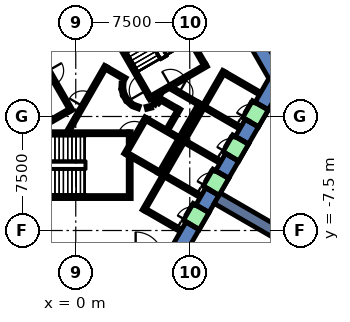
"""IFC4 building model, lengths in metres.
Left out: names, types, materials, properties, quantities, classifications, styles, units other than length and angle.
Written with IfcOpenShell. Run it as: python <this file> out.ifc"""

import sys

from ifc_helpers import new_model, si_unit, direction, frame, frame_2d, origin, place, context, subcontext, project, spatial, polyline, rectangle, outline, extrude, element, fill, save


model = new_model("IFC4")
c1 = context("Model", 3, precision=1e-05, world=origin(), true_north=direction((0.0, 1.0)))
c2 = subcontext(c1, "Body", "Model", "MODEL_VIEW")
j1 = project(units=[si_unit("LENGTHUNIT", "METRE"), si_unit("PLANEANGLEUNIT", "RADIAN")], contexts=[c1])
p1 = place(None, origin())
s1 = spatial("IfcSite", under=j1, at=p1, CompositionType="ELEMENT")
p2 = place(p1, origin())
s2 = spatial("IfcBuilding", under=s1, at=p2, CompositionType="ELEMENT")
p3 = place(p2, origin())
s3 = spatial("IfcBuildingStorey", under=s2, at=p3, CompositionType="ELEMENT", Elevation=0.0)
p4 = place(p3, frame((0.0, 0.0, -0.5)))
e1 = element("IfcWall", 1, at=p4, inside=s3, PredefinedType="SHEAR", context=c2, shape_type="SweptSolid", body=[
    extrude(outline(polyline([(8.517, 11.748), (7.651, 11.248), (12.702, 2.5), (13.856, 2.5), (8.517, 11.748)])), origin(), (0.0, 0.0, 1.0), 9.05),
])
p5 = place(p3, frame((0.0, 0.0, -0.5)))
e2 = element("IfcWall", 2, at=p5, inside=s3, PredefinedType="SHEAR", context=c2, shape_type="SweptSolid", body=[
    extrude(outline(polyline([(8.117, -7.44), (7.252, -6.94), (6.351, -8.5), (6.928, -9.5), (8.117, -7.44)])), origin(), (0.0, 0.0, 1.0), 9.05),
])
p6 = place(p3, frame((0.0, 0.0, -0.5)))
e3 = element("IfcWall", 3, at=p6, inside=s3, PredefinedType="SHEAR", context=c2, shape_type="SweptSolid", body=[
    extrude(outline(polyline([(9.417, -5.189), (8.551, -4.689), (7.902, -5.814), (8.767, -6.314), (9.417, -5.189)])), origin(), (0.0, 0.0, 1.0), 9.05),
])
p7 = place(p3, frame((0.0, 0.0, -0.5)))
e4 = element("IfcWall", 4, at=p7, inside=s3, PredefinedType="SHEAR", context=c2, shape_type="SweptSolid", body=[
    extrude(outline(polyline([(10.717, -2.937), (9.851, -2.437), (9.201, -3.563), (10.067, -4.063), (10.717, -2.937)])), origin(), (0.0, 0.0, 1.0), 9.05),
])
p8 = place(p3, frame((0.0, 0.0, -0.5)))
e5 = element("IfcWall", 5, at=p8, inside=s3, PredefinedType="SHEAR", context=c2, shape_type="SweptSolid", body=[
    extrude(outline(polyline([(12.017, -0.686), (11.151, -0.186), (10.501, -1.311), (11.367, -1.811), (12.017, -0.686)])), origin(), (0.0, 0.0, 1.0), 9.05),
])
p9 = place(p3, frame((0.0, 0.0, -0.5)))
e6 = element("IfcWall", 6, at=p9, inside=s3, PredefinedType="SHEAR", context=c2, shape_type="SweptSolid", body=[
    extrude(outline(polyline([(11.801, 0.94), (12.667, 0.44), (13.856, 2.5), (12.702, 2.5), (11.801, 0.94)])), origin(), (0.0, 0.0, 1.0), 9.05),
])
p10 = place(p3, frame((0.0, 0.0, 3.6)))
e7 = element("IfcWall", 7, at=p10, inside=s3, PredefinedType="SHEAR", context=c2, shape_type="SweptSolid", body=[
    extrude(outline(polyline([(8.767, -6.314), (7.902, -5.814), (7.252, -6.94), (8.117, -7.44), (8.767, -6.314)])), origin(), (0.0, 0.0, 1.0), 4.95),
])
p11 = place(p3, frame((0.0, 0.0, 3.6)))
e8 = element("IfcWall", 8, at=p11, inside=s3, PredefinedType="SHEAR", context=c2, shape_type="SweptSolid", body=[
    extrude(outline(polyline([(10.067, -4.063), (9.201, -3.563), (8.551, -4.689), (9.417, -5.189), (10.067, -4.063)])), origin(), (0.0, 0.0, 1.0), 4.95),
])
p12 = place(p3, frame((0.0, 0.0, 3.6)))
e9 = element("IfcWall", 9, at=p12, inside=s3, PredefinedType="SHEAR", context=c2, shape_type="SweptSolid", body=[
    extrude(outline(polyline([(11.367, -1.811), (10.501, -1.311), (9.851, -2.437), (10.717, -2.937), (11.367, -1.811)])), origin(), (0.0, 0.0, 1.0), 4.95),
])
p13 = place(p3, frame((0.0, 0.0, 3.6)))
e10 = element("IfcWall", 10, at=p13, inside=s3, PredefinedType="SHEAR", context=c2, shape_type="SweptSolid", body=[
    extrude(outline(polyline([(12.667, 0.44), (11.801, 0.94), (11.151, -0.186), (12.017, -0.686), (12.667, 0.44)])), origin(), (0.0, 0.0, 1.0), 4.95),
])
p14 = place(p3, frame((9.31, -5.375, -0.5), z_axis=(0.0, 0.0, 1.0), x_axis=(0.866017533419, -0.500013631625, 0.0)))
e11 = element("IfcWall", 11, at=p14, inside=s3, PredefinedType="SHEAR", context=c2, shape_type="SweptSolid", body=[
    extrude(rectangle(XDim=9.0, YDim=0.8, at=frame_2d((4.5, 0.0))), origin(), (0.0, 0.0, 1.0), 9.05),
])
p15 = place(p3, frame((5.39, 0.898, 0.0), z_axis=(0.0, 0.0, 1.0), x_axis=(0.673828488714, 0.738887791073, 0.0)))
e12 = element("IfcWall", 12, at=p15, inside=s3, PredefinedType="PARTITIONING", context=c2, shape_type="SweptSolid", body=[
    extrude(rectangle(XDim=0.263, YDim=0.2, at=frame_2d((0.131, 0.0))), origin(), (0.0, 0.0, 1.0), 8.55),
])
p16 = place(p3, frame((5.499, 1.172, 0.0), z_axis=(0.0, 0.0, 1.0), x_axis=(0.866333505267, -0.499465972466, 0.0)))
e13 = element("IfcWall", 13, at=p16, inside=s3, PredefinedType="PARTITIONING", context=c2, shape_type="SweptSolid", body=[
    extrude(rectangle(XDim=1.374, YDim=0.2, at=frame_2d((0.687, 0.0))), origin(), (0.0, 0.0, 1.0), 8.55),
])
p17 = place(p3, frame((6.826, 0.522, 0.0), z_axis=(0.0, 0.0, 1.0), x_axis=(-0.500016722714, -0.866015748706, 0.0)))
e14 = element("IfcWall", 14, at=p17, inside=s3, PredefinedType="PARTITIONING", context=c2, shape_type="SweptSolid", body=[
    extrude(rectangle(XDim=1.7, YDim=0.2, at=frame_2d((0.85, 0.0))), origin(), (0.0, 0.0, 1.0), 8.55),
])
p18 = place(p3, frame((8.192, 0.888, 0.0), z_axis=(0.0, 0.0, 1.0), x_axis=(-0.499940625693, -0.866059680843, 0.0)))
e15 = element("IfcWall", 15, at=p18, inside=s3, PredefinedType="PARTITIONING", context=c2, shape_type="SweptSolid", body=[
    extrude(rectangle(XDim=2.68, YDim=0.2, at=frame_2d((1.34, 0.0))), origin(), (0.0, 0.0, 1.0), 8.55),
])
p19 = place(p3, frame((5.135, 0.793, 0.0), z_axis=(0.0, 0.0, 1.0), x_axis=(0.499526442893, 0.866298639529, 0.0)))
e16 = element("IfcWall", 16, at=p19, inside=s3, PredefinedType="PARTITIONING", context=c2, shape_type="SweptSolid", body=[
    extrude(rectangle(XDim=0.791, YDim=0.2, at=frame_2d((0.396, 0.0))), origin(), (0.0, 0.0, 1.0), 8.55),
])
p20 = place(p3, frame((6.25, 1.894, 0.0), z_axis=(0.0, 0.0, 1.0), x_axis=(0.866043184279, -0.499969202016, 0.0)))
e17 = element("IfcWall", 17, at=p20, inside=s3, PredefinedType="PARTITIONING", context=c2, shape_type="SweptSolid", body=[
    extrude(rectangle(XDim=2.084, YDim=0.2, at=frame_2d((1.042, 0.0))), origin(), (0.0, 0.0, 1.0), 8.55),
])
p21 = place(p20, frame((0.642, 0.0, 0.0)))
e18 = element("IfcOpeningElement", 18, at=p21, cuts=e17, PredefinedType="OPENING", context=c2, shape_type="SweptSolid", body=[
    extrude(rectangle(XDim=0.9, YDim=2.1, at=frame_2d((0.45, 1.05))), frame((0.0, 0.11, 0.0), z_axis=(0.0, -1.0, 0.0), x_axis=(1.0, 0.0, 0.0)), (0.0, 0.0, 1.0), 0.22),
])
p22 = place(p3, frame((3.079, 2.199, 0.0), z_axis=(0.0, 0.0, 1.0), x_axis=(-0.047771483479, -0.998858290933, 0.0)))
e19 = element("IfcWall", 19, at=p22, inside=s3, PredefinedType="PARTITIONING", context=c2, shape_type="SweptSolid", body=[
    extrude(rectangle(XDim=0.337, YDim=0.2, at=frame_2d((0.169, 0.0))), origin(), (0.0, 0.0, 1.0), 8.55),
])
p23 = place(p3, frame((3.07, 1.786, 0.0), z_axis=(0.0, 0.0, 1.0), x_axis=(0.242705583207, -0.970099994784, 0.0)))
e20 = element("IfcWall", 20, at=p23, inside=s3, PredefinedType="PARTITIONING", context=c2, shape_type="SweptSolid", body=[
    extrude(rectangle(XDim=0.338, YDim=0.2, at=frame_2d((0.169, 0.0))), origin(), (0.0, 0.0, 1.0), 8.55),
])
for number, where, z_axis, x_axis in (
    (21, (3.182, 1.388, 0.0), (0.0, 0.0, 1.0), (0.512, -0.859, 0.0)),
    (22, (3.404, 1.039, 0.0), (0.0, 0.0, 1.0), (0.74, -0.672, 0.0)),
):
    element("IfcWall", number, at=place(p3, frame(where, z_axis=z_axis, x_axis=x_axis)), inside=s3, PredefinedType="PARTITIONING", context=c2, shape_type="SweptSolid", body=[
        extrude(rectangle(XDim=0.338, YDim=0.2, at=frame_2d((0.169, 0.0))), origin(), (0.0, 0.0, 1.0), 8.55),
    ])
p24 = place(p3, frame((3.838, 0.702, 0.0), z_axis=(0.0, 0.0, 1.0), x_axis=(0.941035081519, -0.338308993895, 0.0)))
e23 = element("IfcWall", 23, at=p24, inside=s3, PredefinedType="PARTITIONING", context=c2, shape_type="SweptSolid", body=[
    extrude(rectangle(XDim=0.337, YDim=0.2, at=frame_2d((0.168, 0.0))), origin(), (0.0, 0.0, 1.0), 8.55),
])
p25 = place(p3, frame((4.644, 0.564, 0.0), z_axis=(0.0, 0.0, 1.0), x_axis=(0.969929076366, 0.243387729394, 0.0)))
e24 = element("IfcWall", 24, at=p25, inside=s3, PredefinedType="PARTITIONING", context=c2, shape_type="SweptSolid", body=[
    extrude(rectangle(XDim=0.337, YDim=0.2, at=frame_2d((0.168, 0.0))), origin(), (0.0, 0.0, 1.0), 8.55),
])
p26 = place(p3, frame((-0.52, -1.0, 0.0), z_axis=(0.0, 0.0, 1.0), x_axis=(0.50011622646, 0.865958290007, 0.0)))
e25 = element("IfcWall", 25, at=p26, inside=s3, PredefinedType="PARTITIONING", context=c2, shape_type="SweptSolid", body=[
    extrude(rectangle(XDim=4.991, YDim=0.2, at=frame_2d((2.496, 0.0))), origin(), (0.0, 0.0, 1.0), 8.55),
])
p27 = place(p26, frame((1.945, 0.0, 0.0)))
e26 = element("IfcOpeningElement", 26, at=p27, cuts=e25, PredefinedType="OPENING", context=c2, shape_type="SweptSolid", body=[
    extrude(rectangle(XDim=1.0, YDim=2.1, at=frame_2d((0.5, 1.05))), frame((0.0, 0.11, 0.0), z_axis=(0.0, -1.0, 0.0), x_axis=(1.0, 0.0, 0.0)), (0.0, 0.0, 1.0), 0.22),
])
p28 = place(p3, frame((2.012, 3.186, 0.0), z_axis=(0.0, 0.0, 1.0), x_axis=(0.865891012941, -0.500232699559, 0.0)))
e27 = element("IfcWall", 27, at=p28, inside=s3, PredefinedType="PARTITIONING", context=c2, shape_type="SweptSolid", body=[
    extrude(rectangle(XDim=1.449, YDim=0.2, at=frame_2d((0.725, 0.0))), origin(), (0.0, 0.0, 1.0), 8.55),
])
p29 = place(p3, frame((-0.412, 0.414, 0.0), z_axis=(0.0, 0.0, 1.0), x_axis=(-0.866017369001, -0.500013916395, 0.0)))
e28 = element("IfcWall", 28, at=p29, inside=s3, PredefinedType="PARTITIONING", context=c2, shape_type="SweptSolid", body=[
    extrude(rectangle(XDim=1.45, YDim=0.2, at=frame_2d((0.725, 0.0))), origin(), (0.0, 0.0, 1.0), 8.55),
])
p30 = place(p3, frame((-2.771, 4.7, 0.0), z_axis=(0.0, 0.0, 1.0), x_axis=(0.499969479948, -0.866043023828, 0.0)))
e29 = element("IfcWall", 29, at=p30, inside=s3, PredefinedType="PARTITIONING", context=c2, shape_type="SweptSolid", body=[
    extrude(rectangle(XDim=4.99, YDim=0.2, at=frame_2d((2.495, 0.0))), origin(), (0.0, 0.0, 1.0), 8.55),
])
p31 = place(p30, frame((1.945, 0.0, 0.0)))
e30 = element("IfcOpeningElement", 30, at=p31, cuts=e29, PredefinedType="OPENING", context=c2, shape_type="SweptSolid", body=[
    extrude(rectangle(XDim=1.0, YDim=2.1, at=frame_2d((0.5, 1.05))), frame((0.0, 0.11, 0.0), z_axis=(0.0, -1.0, 0.0), x_axis=(1.0, 0.0, 0.0)), (0.0, 0.0, 1.0), 0.22),
])
p32 = place(p3, frame((3.24, -2.488, 0.0), z_axis=(0.0, 0.0, 1.0), x_axis=(0.49994636267, 0.866056369097, 0.0)))
e31 = element("IfcWall", 31, at=p32, inside=s3, PredefinedType="STANDARD", context=c2, shape_type="SweptSolid", body=[
    extrude(rectangle(XDim=2.8, YDim=0.2, at=frame_2d((1.4, 0.0))), origin(), (0.0, 0.0, 1.0), 8.55),
])
p33 = place(p32, frame((1.225, 0.0, 0.0)))
e32 = element("IfcOpeningElement", 32, at=p33, cuts=e31, PredefinedType="OPENING", context=c2, shape_type="SweptSolid", body=[
    extrude(rectangle(XDim=1.1, YDim=2.1, at=frame_2d((0.55, 1.05))), frame((0.0, 0.11, 0.0), z_axis=(0.0, -1.0, 0.0), x_axis=(1.0, 0.0, 0.0)), (0.0, 0.0, 1.0), 0.22),
])
p34 = place(p3, frame((5.492, -3.788, 0.0), z_axis=(0.0, 0.0, 1.0), x_axis=(0.500011755427, 0.866018616679, 0.0)))
e33 = element("IfcWall", 33, at=p34, inside=s3, PredefinedType="STANDARD", context=c2, shape_type="SweptSolid", body=[
    extrude(rectangle(XDim=2.8, YDim=0.2, at=frame_2d((1.4, 0.0))), origin(), (0.0, 0.0, 1.0), 8.55),
])
p35 = place(p3, frame((3.377, -2.452, 0.0), z_axis=(0.0, 0.0, 1.0), x_axis=(0.865955154139, -0.50012165622, 0.0)))
e34 = element("IfcWall", 34, at=p35, inside=s3, PredefinedType="STANDARD", context=c2, shape_type="SweptSolid", body=[
    extrude(rectangle(XDim=2.4, YDim=0.2, at=frame_2d((1.2, 0.0))), origin(), (0.0, 0.0, 1.0), 8.55),
])
p36 = place(p3, frame((4.677, -0.2, 0.0), z_axis=(0.0, 0.0, 1.0), x_axis=(0.865973769406, -0.500089422704, 0.0)))
e35 = element("IfcWall", 35, at=p36, inside=s3, PredefinedType="STANDARD", context=c2, shape_type="SweptSolid", body=[
    extrude(rectangle(XDim=2.399, YDim=0.2, at=frame_2d((1.2, 0.0))), origin(), (0.0, 0.0, 1.0), 8.55),
])
p37 = place(p3, frame((4.451, -6.19, 0.0), z_axis=(0.0, 0.0, 1.0), x_axis=(0.50000090737, 0.866024879913, 0.0)))
e36 = element("IfcWall", 36, at=p37, inside=s3, PredefinedType="STANDARD", context=c2, shape_type="SweptSolid", body=[
    extrude(rectangle(XDim=10.6, YDim=0.2, at=frame_2d((5.3, 0.0))), origin(), (0.0, 0.0, 1.0), 8.55),
])
for number, where, z_axis, x_axis in (
    (37, (4.588, -6.153, 0.0), (0.0, 0.0, 1.0), (0.866, -0.5, 0.0)),
    (38, (5.888, -3.902, 0.0), (0.0, 0.0, 1.0), (0.866, -0.5, 0.0)),
    (39, (7.188, -1.65, 0.0), (0.0, 0.0, 1.0), (0.866, -0.5, 0.0)),
    (40, (8.488, 0.602, 0.0), (0.0, 0.0, 1.0), (0.866, -0.5, 0.0)),
):
    element("IfcWall", number, at=place(p3, frame(where, z_axis=z_axis, x_axis=x_axis)), inside=s3, PredefinedType="STANDARD", context=c2, shape_type="SweptSolid", body=[
        extrude(rectangle(XDim=2.5, YDim=0.2, at=frame_2d((1.25, 0.0))), origin(), (0.0, 0.0, 1.0), 8.55),
    ])
p38 = place(p3, frame((9.788, 2.853, 0.0), z_axis=(0.0, 0.0, 1.0), x_axis=(0.865998541277, -0.500046524342, 0.0)))
e41 = element("IfcWall", 41, at=p38, inside=s3, PredefinedType="STANDARD", context=c2, shape_type="SweptSolid", body=[
    extrude(rectangle(XDim=2.5, YDim=0.2, at=frame_2d((1.25, 0.0))), origin(), (0.0, 0.0, 1.0), 8.55),
])
p39 = place(p3, frame((7.598, -7.14, 0.0), z_axis=(0.0, 0.0, 1.0), x_axis=(0.500362116554, 0.865816234728, 0.0)))
e42 = element("IfcWall", 42, at=p39, inside=s3, PredefinedType="STANDARD", context=c2, shape_type="SweptSolid", body=[
    extrude(rectangle(XDim=1.299, YDim=1.2, at=frame_2d((0.65, 0.0))), origin(), (0.0, 0.0, 1.0), 2.4),
])
p40 = place(p39, frame((0.1, 0.0, 0.0)))
e43 = element("IfcOpeningElement", 43, at=p40, cuts=e42, PredefinedType="OPENING", context=c2, shape_type="SweptSolid", body=[
    extrude(rectangle(XDim=1.1, YDim=2.3, at=frame_2d((0.55, 1.15))), frame((0.0, 0.61, 0.0), z_axis=(0.0, -1.0, 0.0), x_axis=(1.0, 0.0, 0.0)), (0.0, 0.0, 1.0), 1.22),
])
p41 = place(p3, frame((8.898, -4.889, 0.0), z_axis=(0.0, 0.0, 1.0), x_axis=(0.500036693733, 0.866004217611, 0.0)))
e44 = element("IfcWall", 44, at=p41, inside=s3, PredefinedType="STANDARD", context=c2, shape_type="SweptSolid", body=[
    extrude(rectangle(XDim=1.3, YDim=1.2, at=frame_2d((0.65, 0.0))), origin(), (0.0, 0.0, 1.0), 2.4),
])
p42 = place(p41, frame((0.1, 0.0, 0.0)))
e45 = element("IfcOpeningElement", 45, at=p42, cuts=e44, PredefinedType="OPENING", context=c2, shape_type="SweptSolid", body=[
    extrude(rectangle(XDim=1.1, YDim=2.3, at=frame_2d((0.55, 1.15))), frame((0.0, 0.61, 0.0), z_axis=(0.0, -1.0, 0.0), x_axis=(1.0, 0.0, 0.0)), (0.0, 0.0, 1.0), 1.22),
])
p43 = place(p3, frame((10.198, -2.637, 0.0), z_axis=(0.0, 0.0, 1.0), x_axis=(0.49989585183, 0.866085525409, 0.0)))
e46 = element("IfcWall", 46, at=p43, inside=s3, PredefinedType="STANDARD", context=c2, shape_type="SweptSolid", body=[
    extrude(rectangle(XDim=1.3, YDim=1.2, at=frame_2d((0.65, 0.0))), origin(), (0.0, 0.0, 1.0), 2.4),
])
p44 = place(p43, frame((0.1, 0.0, 0.0)))
e47 = element("IfcOpeningElement", 47, at=p44, cuts=e46, PredefinedType="OPENING", context=c2, shape_type="SweptSolid", body=[
    extrude(rectangle(XDim=1.1, YDim=2.3, at=frame_2d((0.55, 1.15))), frame((0.0, 0.61, 0.0), z_axis=(0.0, -1.0, 0.0), x_axis=(1.0, 0.0, 0.0)), (0.0, 0.0, 1.0), 1.22),
])
p45 = place(p3, frame((11.498, -0.385, 0.0), z_axis=(0.0, 0.0, 1.0), x_axis=(0.500221244143, 0.865897630733, 0.0)))
e48 = element("IfcWall", 48, at=p45, inside=s3, PredefinedType="STANDARD", context=c2, shape_type="SweptSolid", body=[
    extrude(rectangle(XDim=1.299, YDim=1.2, at=frame_2d((0.65, 0.0))), origin(), (0.0, 0.0, 1.0), 2.4),
])
p46 = place(p45, frame((0.1, 0.0, 0.0)))
e49 = element("IfcOpeningElement", 49, at=p46, cuts=e48, PredefinedType="OPENING", context=c2, shape_type="SweptSolid", body=[
    extrude(rectangle(XDim=1.1, YDim=2.3, at=frame_2d((0.55, 1.15))), frame((0.0, 0.61, 0.0), z_axis=(0.0, -1.0, 0.0), x_axis=(1.0, 0.0, 0.0)), (0.0, 0.0, 1.0), 1.22),
])
p47 = place(p3, frame((3.55, -2.667, 0.0), z_axis=(0.0, 0.0, 1.0), x_axis=(0.0, -1.0, 0.0)))
e50 = element("IfcWall", 50, at=p47, inside=s3, PredefinedType="STANDARD", context=c2, shape_type="SweptSolid", body=[
    extrude(rectangle(XDim=2.733, YDim=0.2, at=frame_2d((1.366, 0.0))), origin(), (0.0, 0.0, 1.0), 8.55),
])
p48 = place(p3, frame((3.55, -1.0, 0.0), z_axis=(0.0, 0.0, 1.0), x_axis=(0.0, -1.0, 0.0)))
e51 = element("IfcWall", 51, at=p48, inside=s3, PredefinedType="STANDARD", context=c2, shape_type="SweptSolid", body=[
    extrude(rectangle(XDim=0.751, YDim=0.2, at=frame_2d((0.375, 0.0))), origin(), (0.0, 0.0, 1.0), 8.55),
])
p49 = place(p3, frame((-3.45, -1.1, 0.0), z_axis=(0.0, 0.0, 1.0), x_axis=(1.0, 0.0, 0.0)))
e52 = element("IfcWall", 52, at=p49, inside=s3, PredefinedType="STANDARD", context=c2, shape_type="SweptSolid", body=[
    extrude(rectangle(XDim=6.9, YDim=0.2, at=frame_2d((3.45, 0.0))), origin(), (0.0, 0.0, 1.0), 8.55),
])
p50 = place(p49, frame((0.45, 0.0, 0.0)))
e53 = element("IfcOpeningElement", 53, at=p50, cuts=e52, PredefinedType="OPENING", context=c2, shape_type="SweptSolid", body=[
    extrude(rectangle(XDim=1.1, YDim=2.2, at=frame_2d((0.55, 1.1))), frame((0.0, 0.11, 0.0), z_axis=(0.0, -1.0, 0.0), x_axis=(1.0, 0.0, 0.0)), (0.0, 0.0, 1.0), 0.22),
])
p51 = place(p3, frame((-3.45, -5.3, 0.0), z_axis=(0.0, 0.0, 1.0), x_axis=(1.0, 0.0, 0.0)))
e54 = element("IfcWall", 54, at=p51, inside=s3, PredefinedType="STANDARD", context=c2, shape_type="SweptSolid", body=[
    extrude(rectangle(XDim=6.9, YDim=0.2, at=frame_2d((3.45, 0.0))), origin(), (0.0, 0.0, 1.0), 8.55),
])
p52 = place(p3, frame((4.806, 1.176, 0.0), z_axis=(0.0, 0.0, 1.0), x_axis=(0.866059941101, 0.499940174841, 0.0)))
e55 = element("IfcWall", 55, at=p52, inside=s3, PredefinedType="STANDARD", context=c2, shape_type="SweptSolid", body=[
    extrude(rectangle(XDim=4.4, YDim=0.2, at=frame_2d((2.2, 0.0))), origin(), (0.0, 0.0, 1.0), 8.55),
])
p53 = place(p52, frame((1.65, 0.0, 0.0)))
e56 = element("IfcOpeningElement", 56, at=p53, cuts=e55, PredefinedType="OPENING", context=c2, shape_type="SweptSolid", body=[
    extrude(rectangle(XDim=1.1, YDim=2.2, at=frame_2d((0.55, 1.1))), frame((0.0, 0.11, 0.0), z_axis=(0.0, -1.0, 0.0), x_axis=(1.0, 0.0, 0.0)), (0.0, 0.0, 1.0), 0.22),
])
p54 = place(p3, frame((4.843, 1.312, 0.0), z_axis=(0.0, 0.0, 1.0), x_axis=(-0.499963383562, 0.866046543262, 0.0)))
e57 = element("IfcWall", 57, at=p54, inside=s3, PredefinedType="STANDARD", context=c2, shape_type="SweptSolid", body=[
    extrude(rectangle(XDim=6.9, YDim=0.2, at=frame_2d((3.45, 0.0))), origin(), (0.0, 0.0, 1.0), 8.55),
])
p55 = place(p54, frame((0.45, 0.0, 0.0)))
e58 = element("IfcOpeningElement", 58, at=p55, cuts=e57, PredefinedType="OPENING", context=c2, shape_type="SweptSolid", body=[
    extrude(rectangle(XDim=1.1, YDim=2.2, at=frame_2d((0.55, 1.1))), frame((0.0, 0.11, 0.0), z_axis=(0.0, -1.0, 0.0), x_axis=(1.0, 0.0, 0.0)), (0.0, 0.0, 1.0), 0.22),
])
p56 = place(p3, frame((8.48, 3.412, 0.0), z_axis=(0.0, 0.0, 1.0), x_axis=(-0.499978703459, 0.866037698999, 0.0)))
e59 = element("IfcWall", 59, at=p56, inside=s3, PredefinedType="STANDARD", context=c2, shape_type="SweptSolid", body=[
    extrude(rectangle(XDim=6.9, YDim=0.2, at=frame_2d((3.45, 0.0))), origin(), (0.0, 0.0, 1.0), 8.55),
])
p57 = place(p3, frame((-1.393, 7.288, 0.0), z_axis=(0.0, 0.0, 1.0), x_axis=(-0.499963383562, -0.866046543262, 0.0)))
e60 = element("IfcWall", 60, at=p57, inside=s3, PredefinedType="STANDARD", context=c2, shape_type="SweptSolid", body=[
    extrude(rectangle(XDim=6.9, YDim=0.2, at=frame_2d((3.45, 0.0))), origin(), (0.0, 0.0, 1.0), 8.55),
])
p58 = place(p57, frame((0.45, 0.0, 0.0)))
e61 = element("IfcOpeningElement", 61, at=p58, cuts=e60, PredefinedType="OPENING", context=c2, shape_type="SweptSolid", body=[
    extrude(rectangle(XDim=1.1, YDim=2.2, at=frame_2d((0.55, 1.1))), frame((0.0, 0.11, 0.0), z_axis=(0.0, -1.0, 0.0), x_axis=(1.0, 0.0, 0.0)), (0.0, 0.0, 1.0), 0.22),
])
p59 = place(p27, origin())
e62 = element("IfcDoor", 62, at=p59, inside=s3, OperationType="SINGLE_SWING_LEFT", PredefinedType="DOOR", context=c2, shape_type="SweptSolid", body=[
    extrude(rectangle(XDim=1.0, YDim=2.1, at=frame_2d((0.5, 1.05))), frame((0.0, 0.025, 0.0), z_axis=(0.0, -1.0, 0.0), x_axis=(1.0, 0.0, 0.0)), (0.0, 0.0, 1.0), 0.05),
])
fill(e26, e62)
p60 = place(p31, origin())
e63 = element("IfcDoor", 63, at=p60, inside=s3, OperationType="SINGLE_SWING_RIGHT", PredefinedType="DOOR", context=c2, shape_type="SweptSolid", body=[
    extrude(rectangle(XDim=1.0, YDim=2.1, at=frame_2d((0.5, 1.05))), frame((0.0, 0.025, 0.0), z_axis=(0.0, -1.0, 0.0), x_axis=(1.0, 0.0, 0.0)), (0.0, 0.0, 1.0), 0.05),
])
fill(e30, e63)
p61 = place(p21, origin())
e64 = element("IfcDoor", 64, at=p61, inside=s3, OperationType="SINGLE_SWING_LEFT", PredefinedType="DOOR", context=c2, shape_type="SweptSolid", body=[
    extrude(rectangle(XDim=0.9, YDim=2.1, at=frame_2d((0.45, 1.05))), frame((0.0, 0.025, 0.0), z_axis=(0.0, -1.0, 0.0), x_axis=(1.0, 0.0, 0.0)), (0.0, 0.0, 1.0), 0.05),
])
fill(e18, e64)
p62 = place(p40, origin())
e65 = element("IfcDoor", 65, at=p62, inside=s3, OperationType="SLIDING_TO_LEFT", PredefinedType="DOOR", context=c2, shape_type="SweptSolid", body=[
    extrude(rectangle(XDim=1.1, YDim=2.3, at=frame_2d((0.55, 1.15))), frame((0.0, 0.025, 0.0), z_axis=(0.0, -1.0, 0.0), x_axis=(1.0, 0.0, 0.0)), (0.0, 0.0, 1.0), 0.05),
])
fill(e43, e65)
p63 = place(p42, origin())
e66 = element("IfcDoor", 66, at=p63, inside=s3, OperationType="SLIDING_TO_LEFT", PredefinedType="DOOR", context=c2, shape_type="SweptSolid", body=[
    extrude(rectangle(XDim=1.1, YDim=2.3, at=frame_2d((0.55, 1.15))), frame((0.0, 0.025, 0.0), z_axis=(0.0, -1.0, 0.0), x_axis=(1.0, 0.0, 0.0)), (0.0, 0.0, 1.0), 0.05),
])
fill(e45, e66)
p64 = place(p44, origin())
e67 = element("IfcDoor", 67, at=p64, inside=s3, OperationType="SLIDING_TO_LEFT", PredefinedType="DOOR", context=c2, shape_type="SweptSolid", body=[
    extrude(rectangle(XDim=1.1, YDim=2.3, at=frame_2d((0.55, 1.15))), frame((0.0, 0.025, 0.0), z_axis=(0.0, -1.0, 0.0), x_axis=(1.0, 0.0, 0.0)), (0.0, 0.0, 1.0), 0.05),
])
fill(e47, e67)
p65 = place(p46, origin())
e68 = element("IfcDoor", 68, at=p65, inside=s3, OperationType="SLIDING_TO_LEFT", PredefinedType="DOOR", context=c2, shape_type="SweptSolid", body=[
    extrude(rectangle(XDim=1.1, YDim=2.3, at=frame_2d((0.55, 1.15))), frame((0.0, 0.025, 0.0), z_axis=(0.0, -1.0, 0.0), x_axis=(1.0, 0.0, 0.0)), (0.0, 0.0, 1.0), 0.05),
])
fill(e49, e68)
p66 = place(p33, origin())
e69 = element("IfcDoor", 69, at=p66, inside=s3, OperationType="SLIDING_TO_LEFT", PredefinedType="DOOR", context=c2, shape_type="SweptSolid", body=[
    extrude(rectangle(XDim=1.1, YDim=2.1, at=frame_2d((0.55, 1.05))), frame((0.0, 0.025, 0.0), z_axis=(0.0, -1.0, 0.0), x_axis=(1.0, 0.0, 0.0)), (0.0, 0.0, 1.0), 0.05),
])
fill(e32, e69)
p67 = place(p55, origin())
e70 = element("IfcDoor", 70, at=p67, inside=s3, OperationType="SINGLE_SWING_LEFT", PredefinedType="DOOR", context=c2, shape_type="SweptSolid", body=[
    extrude(rectangle(XDim=1.1, YDim=2.2, at=frame_2d((0.55, 1.1))), frame((0.0, 0.025, 0.0), z_axis=(0.0, -1.0, 0.0), x_axis=(1.0, 0.0, 0.0)), (0.0, 0.0, 1.0), 0.05),
])
fill(e58, e70)
p68 = place(p53, origin())
e71 = element("IfcDoor", 71, at=p68, inside=s3, OperationType="SINGLE_SWING_LEFT", PredefinedType="DOOR", context=c2, shape_type="SweptSolid", body=[
    extrude(rectangle(XDim=1.1, YDim=2.2, at=frame_2d((0.55, 1.1))), frame((0.0, 0.025, 0.0), z_axis=(0.0, -1.0, 0.0), x_axis=(1.0, 0.0, 0.0)), (0.0, 0.0, 1.0), 0.05),
])
fill(e56, e71)
save(model, sys.argv[1])
